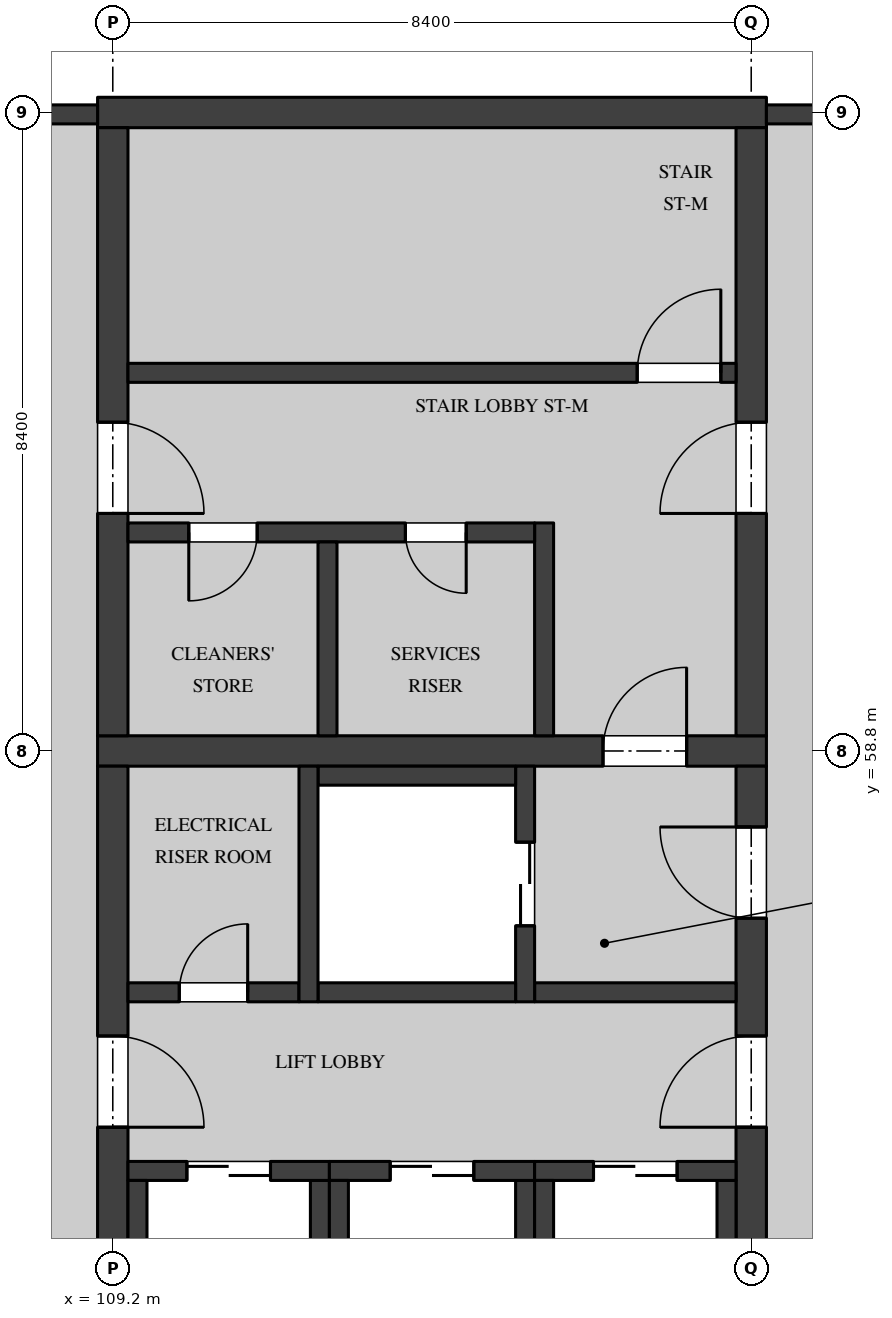
"""IFC4 building model, lengths in metres.
Left out: names, types, materials, properties, quantities, classifications, styles, units other than length and angle.
Written with IfcOpenShell. Run it as: python <this file> out.ifc"""

import sys

from ifc_helpers import new_model, si_unit, direction, frame, frame_2d, origin, place, context, subcontext, project, spatial, rectangle, extrude, element, fill, save


model = new_model("IFC4")
c1 = context("Model", 3, precision=1e-05, world=origin(), true_north=direction((0.0, 1.0)))
c2 = subcontext(c1, "Body", "Model", "MODEL_VIEW")
j1 = project(units=[si_unit("LENGTHUNIT", "METRE"), si_unit("PLANEANGLEUNIT", "RADIAN")], contexts=[c1])
p1 = place(None, origin())
s1 = spatial("IfcSite", under=j1, at=p1, CompositionType="ELEMENT")
p2 = place(p1, origin())
s2 = spatial("IfcBuilding", under=s1, at=p2, CompositionType="ELEMENT")
p3 = place(p2, frame((0.0, 0.0, 32.4)))
s3 = spatial("IfcBuildingStorey", under=s2, at=p3, CompositionType="ELEMENT", Elevation=32.4)
p4 = place(p3, frame((109.0, 58.8, 0.0), z_axis=(0.0, 0.0, 1.0), x_axis=(1.0, 0.0, 0.0)))
e1 = element("IfcWall", 1, at=p4, inside=s3, PredefinedType="SHEAR", context=c2, shape_type="SweptSolid", body=[
    extrude(rectangle(XDim=8.8, YDim=0.4, at=frame_2d((4.4, 0.0))), origin(), (0.0, 0.0, 1.0), 4.37),
])
p5 = place(p4, frame((6.65, 0.0, 0.0)))
e2 = element("IfcOpeningElement", 2, at=p5, cuts=e1, PredefinedType="OPENING", context=c2, shape_type="SweptSolid", body=[
    extrude(rectangle(XDim=1.1, YDim=2.1, at=frame_2d((0.55, 1.05))), frame((0.0, 0.21, 0.0), z_axis=(0.0, -1.0, 0.0), x_axis=(1.0, 0.0, 0.0)), (0.0, 0.0, 1.0), 0.42),
])
p6 = place(p3, frame((109.2, 50.6, 0.0), z_axis=(0.0, 0.0, 1.0), x_axis=(0.0, 1.0, 0.0)))
e3 = element("IfcWall", 3, at=p6, inside=s3, PredefinedType="SHEAR", context=c2, shape_type="SweptSolid", body=[
    extrude(rectangle(XDim=8.0, YDim=0.4, at=frame_2d((4.0, 0.0))), origin(), (0.0, 0.0, 1.0), 4.37),
])
p7 = place(p6, frame((3.25, 0.0, 0.0)))
e4 = element("IfcOpeningElement", 4, at=p7, cuts=e3, PredefinedType="OPENING", context=c2, shape_type="SweptSolid", body=[
    extrude(rectangle(XDim=1.2, YDim=2.1, at=frame_2d((0.6, 1.05))), frame((0.0, 0.21, 0.0), z_axis=(0.0, -1.0, 0.0), x_axis=(1.0, 0.0, 0.0)), (0.0, 0.0, 1.0), 0.42),
])
p8 = place(p3, frame((117.6, 50.6, 0.0), z_axis=(0.0, 0.0, 1.0), x_axis=(0.0, 1.0, 0.0)))
e5 = element("IfcWall", 5, at=p8, inside=s3, PredefinedType="SHEAR", context=c2, shape_type="SweptSolid", body=[
    extrude(rectangle(XDim=8.0, YDim=0.4, at=frame_2d((4.0, 0.0))), origin(), (0.0, 0.0, 1.0), 4.37),
])
p9 = place(p8, frame((3.25, 0.0, 0.0)))
e6 = element("IfcOpeningElement", 6, at=p9, cuts=e5, PredefinedType="OPENING", context=c2, shape_type="SweptSolid", body=[
    extrude(rectangle(XDim=1.2, YDim=2.1, at=frame_2d((0.6, 1.05))), frame((0.0, 0.21, 0.0), z_axis=(0.0, -1.0, 0.0), x_axis=(1.0, 0.0, 0.0)), (0.0, 0.0, 1.0), 0.42),
])
p10 = place(p8, frame((6.0, 0.0, 0.0)))
e7 = element("IfcOpeningElement", 7, at=p10, cuts=e5, PredefinedType="OPENING", context=c2, shape_type="SweptSolid", body=[
    extrude(rectangle(XDim=1.2, YDim=2.1, at=frame_2d((0.6, 1.05))), frame((0.0, 0.21, 0.0), z_axis=(0.0, -1.0, 0.0), x_axis=(1.0, 0.0, 0.0)), (0.0, 0.0, 1.0), 0.42),
])
p11 = place(p3, frame((109.4, 55.625, 0.0), z_axis=(0.0, 0.0, 1.0), x_axis=(1.0, 0.0, 0.0)))
e8 = element("IfcWall", 8, at=p11, inside=s3, PredefinedType="SOLIDWALL", context=c2, shape_type="SweptSolid", body=[
    extrude(rectangle(XDim=2.25, YDim=0.25, at=frame_2d((1.125, 0.0))), origin(), (0.0, 0.0, 1.0), 4.37),
])
p12 = place(p11, frame((0.675, 0.0, 0.0)))
e9 = element("IfcOpeningElement", 9, at=p12, cuts=e8, PredefinedType="OPENING", context=c2, shape_type="SweptSolid", body=[
    extrude(rectangle(XDim=0.9, YDim=2.1, at=frame_2d((0.45, 1.05))), frame((0.0, 0.135, 0.0), z_axis=(0.0, -1.0, 0.0), x_axis=(1.0, 0.0, 0.0)), (0.0, 0.0, 1.0), 0.27),
])
p13 = place(p3, frame((114.75, 55.625, 0.0), z_axis=(0.0, 0.0, 1.0), x_axis=(1.0, 0.0, 0.0)))
e10 = element("IfcWall", 10, at=p13, inside=s3, PredefinedType="SOLIDWALL", context=c2, shape_type="SweptSolid", body=[
    extrude(rectangle(XDim=2.65, YDim=0.25, at=frame_2d((1.325, 0.0))), origin(), (0.0, 0.0, 1.0), 4.37),
])
p14 = place(p3, frame((109.0, 67.2, 0.0), z_axis=(0.0, 0.0, 1.0), x_axis=(1.0, 0.0, 0.0)))
e11 = element("IfcWall", 11, at=p14, inside=s3, PredefinedType="SHEAR", context=c2, shape_type="SweptSolid", body=[
    extrude(rectangle(XDim=8.8, YDim=0.4, at=frame_2d((4.4, 0.0))), origin(), (0.0, 0.0, 1.0), 4.37),
])
p15 = place(p3, frame((109.2, 59.0, 0.0), z_axis=(0.0, 0.0, 1.0), x_axis=(0.0, 1.0, 0.0)))
e12 = element("IfcWall", 12, at=p15, inside=s3, PredefinedType="SHEAR", context=c2, shape_type="SweptSolid", body=[
    extrude(rectangle(XDim=8.0, YDim=0.4, at=frame_2d((4.0, 0.0))), origin(), (0.0, 0.0, 1.0), 4.37),
])
p16 = place(p15, frame((2.925, 0.0, 0.0)))
e13 = element("IfcOpeningElement", 13, at=p16, cuts=e12, PredefinedType="OPENING", context=c2, shape_type="SweptSolid", body=[
    extrude(rectangle(XDim=1.2, YDim=2.1, at=frame_2d((0.6, 1.05))), frame((0.0, 0.21, 0.0), z_axis=(0.0, -1.0, 0.0), x_axis=(1.0, 0.0, 0.0)), (0.0, 0.0, 1.0), 0.42),
])
p17 = place(p3, frame((117.6, 59.0, 0.0), z_axis=(0.0, 0.0, 1.0), x_axis=(0.0, 1.0, 0.0)))
e14 = element("IfcWall", 14, at=p17, inside=s3, PredefinedType="SHEAR", context=c2, shape_type="SweptSolid", body=[
    extrude(rectangle(XDim=8.0, YDim=0.4, at=frame_2d((4.0, 0.0))), origin(), (0.0, 0.0, 1.0), 4.37),
])
p18 = place(p17, frame((2.925, 0.0, 0.0)))
e15 = element("IfcOpeningElement", 15, at=p18, cuts=e14, PredefinedType="OPENING", context=c2, shape_type="SweptSolid", body=[
    extrude(rectangle(XDim=1.2, YDim=2.1, at=frame_2d((0.6, 1.05))), frame((0.0, 0.21, 0.0), z_axis=(0.0, -1.0, 0.0), x_axis=(1.0, 0.0, 0.0)), (0.0, 0.0, 1.0), 0.42),
])
p19 = place(p3, frame((117.4, 63.775, 0.0), z_axis=(0.0, 0.0, 1.0), x_axis=(-1.0, 0.0, 0.0)))
e16 = element("IfcWall", 16, at=p19, inside=s3, PredefinedType="SOLIDWALL", context=c2, shape_type="SweptSolid", body=[
    extrude(rectangle(XDim=8.0, YDim=0.25, at=frame_2d((4.0, 0.0))), origin(), (0.0, 0.0, 1.0), 4.37),
])
p20 = place(p19, frame((0.2, 0.0, 0.0)))
e17 = element("IfcOpeningElement", 17, at=p20, cuts=e16, PredefinedType="OPENING", context=c2, shape_type="SweptSolid", body=[
    extrude(rectangle(XDim=1.1, YDim=2.1, at=frame_2d((0.55, 1.05))), frame((0.0, 0.135, 0.0), z_axis=(0.0, -1.0, 0.0), x_axis=(1.0, 0.0, 0.0)), (0.0, 0.0, 1.0), 0.27),
])
p21 = place(p3, frame((114.875, 61.8, 0.0), z_axis=(0.0, 0.0, 1.0), x_axis=(0.0, -1.0, 0.0)))
e18 = element("IfcWall", 18, at=p21, inside=s3, PredefinedType="SOLIDWALL", context=c2, shape_type="SweptSolid", body=[
    extrude(rectangle(XDim=2.8, YDim=0.25, at=frame_2d((1.4, 0.0))), origin(), (0.0, 0.0, 1.0), 4.37),
])
p22 = place(p3, frame((114.75, 61.675, 0.0), z_axis=(0.0, 0.0, 1.0), x_axis=(-1.0, 0.0, 0.0)))
e19 = element("IfcWall", 19, at=p22, inside=s3, PredefinedType="SOLIDWALL", context=c2, shape_type="SweptSolid", body=[
    extrude(rectangle(XDim=5.35, YDim=0.25, at=frame_2d((2.675, 0.0))), origin(), (0.0, 0.0, 1.0), 4.37),
])
p23 = place(p22, frame((3.65, 0.0, 0.0)))
e20 = element("IfcOpeningElement", 20, at=p23, cuts=e19, PredefinedType="OPENING", context=c2, shape_type="SweptSolid", body=[
    extrude(rectangle(XDim=0.9, YDim=2.1, at=frame_2d((0.45, 1.05))), frame((0.0, 0.135, 0.0), z_axis=(0.0, -1.0, 0.0), x_axis=(1.0, 0.0, 0.0)), (0.0, 0.0, 1.0), 0.27),
])
p24 = place(p22, frame((0.9, 0.0, 0.0)))
e21 = element("IfcOpeningElement", 21, at=p24, cuts=e19, PredefinedType="OPENING", context=c2, shape_type="SweptSolid", body=[
    extrude(rectangle(XDim=0.8, YDim=2.1, at=frame_2d((0.4, 1.05))), frame((0.0, 0.135, 0.0), z_axis=(0.0, -1.0, 0.0), x_axis=(1.0, 0.0, 0.0)), (0.0, 0.0, 1.0), 0.27),
])
p25 = place(p3, frame((112.025, 61.55, 0.0), z_axis=(0.0, 0.0, 1.0), x_axis=(0.0, -1.0, 0.0)))
e22 = element("IfcWall", 22, at=p25, inside=s3, PredefinedType="SOLIDWALL", context=c2, shape_type="SweptSolid", body=[
    extrude(rectangle(XDim=2.55, YDim=0.25, at=frame_2d((1.275, 0.0))), origin(), (0.0, 0.0, 1.0), 4.37),
])
p26 = place(p3, frame((114.625, 55.5, 0.0), z_axis=(0.0, 0.0, 1.0), x_axis=(0.0, 1.0, 0.0)))
e23 = element("IfcWall", 23, at=p26, inside=s3, PredefinedType="SOLIDWALL", context=c2, shape_type="SweptSolid", body=[
    extrude(rectangle(XDim=3.1, YDim=0.25, at=frame_2d((1.55, 0.0))), origin(), (0.0, 0.0, 1.0), 4.37),
])
p27 = place(p26, frame((1.0, 0.0, 0.0)))
e24 = element("IfcOpeningElement", 24, at=p27, cuts=e23, PredefinedType="OPENING", context=c2, shape_type="SweptSolid", body=[
    extrude(rectangle(XDim=1.1, YDim=2.1, at=frame_2d((0.55, 1.05))), frame((0.0, 0.135, 0.0), z_axis=(0.0, -1.0, 0.0), x_axis=(1.0, 0.0, 0.0)), (0.0, 0.0, 1.0), 0.27),
])
for number, where, z_axis, x_axis in (
    (25, (111.9, 58.475, 0.0), (0.0, 0.0, 1.0), (1.0, 0.0, 0.0)),
    (26, (111.9, 55.625, 0.0), (0.0, 0.0, 1.0), (1.0, 0.0, 0.0)),
):
    element("IfcWall", number, at=place(p3, frame(where, z_axis=z_axis, x_axis=x_axis)), inside=s3, PredefinedType="SOLIDWALL", context=c2, shape_type="SweptSolid", body=[
        extrude(rectangle(XDim=2.6, YDim=0.25, at=frame_2d((1.3, 0.0))), origin(), (0.0, 0.0, 1.0), 4.37),
    ])
p28 = place(p3, frame((111.775, 55.5, 0.0), z_axis=(0.0, 0.0, 1.0), x_axis=(0.0, 1.0, 0.0)))
e27 = element("IfcWall", 27, at=p28, inside=s3, PredefinedType="SOLIDWALL", context=c2, shape_type="SweptSolid", body=[
    extrude(rectangle(XDim=3.1, YDim=0.25, at=frame_2d((1.55, 0.0))), origin(), (0.0, 0.0, 1.0), 4.37),
])
p29 = place(p3, frame((111.925, 50.85, 0.0), z_axis=(0.0, 0.0, 1.0), x_axis=(0.0, 1.0, 0.0)))
e28 = element("IfcWall", 28, at=p29, inside=s3, PredefinedType="SOLIDWALL", context=c2, shape_type="SweptSolid", body=[
    extrude(rectangle(XDim=2.3, YDim=0.25, at=frame_2d((1.15, 0.0))), origin(), (0.0, 0.0, 1.0), 4.37),
])
p30 = place(p3, frame((109.4, 53.275, 0.0), z_axis=(0.0, 0.0, 1.0), x_axis=(1.0, 0.0, 0.0)))
e29 = element("IfcWall", 29, at=p30, inside=s3, PredefinedType="SOLIDWALL", context=c2, shape_type="SweptSolid", body=[
    extrude(rectangle(XDim=2.65, YDim=0.25, at=frame_2d((1.325, 0.0))), origin(), (0.0, 0.0, 1.0), 4.37),
])
p31 = place(p30, frame((0.775, 0.0, 0.0)))
e30 = element("IfcOpeningElement", 30, at=p31, cuts=e29, PredefinedType="OPENING", context=c2, shape_type="SweptSolid", body=[
    extrude(rectangle(XDim=1.1, YDim=2.1, at=frame_2d((0.55, 1.05))), frame((0.0, 0.135, 0.0), z_axis=(0.0, -1.0, 0.0), x_axis=(1.0, 0.0, 0.0)), (0.0, 0.0, 1.0), 0.27),
])
for number, where, z_axis, x_axis in (
    (31, (109.525, 50.85, 0.0), (0.0, 0.0, 1.0), (0.0, 1.0, 0.0)),
    (32, (114.625, 50.85, 0.0), (0.0, 0.0, 1.0), (0.0, 1.0, 0.0)),
):
    element("IfcWall", number, at=place(p3, frame(where, z_axis=z_axis, x_axis=x_axis)), inside=s3, PredefinedType="SOLIDWALL", context=c2, shape_type="SweptSolid", body=[
        extrude(rectangle(XDim=2.3, YDim=0.25, at=frame_2d((1.15, 0.0))), origin(), (0.0, 0.0, 1.0), 4.37),
    ])
p32 = place(p3, frame((112.05, 53.275, 0.0), z_axis=(0.0, 0.0, 1.0), x_axis=(1.0, 0.0, 0.0)))
e33 = element("IfcWall", 33, at=p32, inside=s3, PredefinedType="SOLIDWALL", context=c2, shape_type="SweptSolid", body=[
    extrude(rectangle(XDim=2.7, YDim=0.25, at=frame_2d((1.35, 0.0))), origin(), (0.0, 0.0, 1.0), 4.37),
])
p33 = place(p32, frame((0.8, 0.0, 0.0)))
e34 = element("IfcOpeningElement", 34, at=p33, cuts=e33, PredefinedType="OPENING", context=c2, shape_type="SweptSolid", body=[
    extrude(rectangle(XDim=1.1, YDim=2.1, at=frame_2d((0.55, 1.05))), frame((0.0, 0.135, 0.0), z_axis=(0.0, -1.0, 0.0), x_axis=(1.0, 0.0, 0.0)), (0.0, 0.0, 1.0), 0.27),
])
for number, where, z_axis, x_axis in (
    (35, (112.175, 50.85, 0.0), (0.0, 0.0, 1.0), (0.0, 1.0, 0.0)),
    (36, (117.275, 50.85, 0.0), (0.0, 0.0, 1.0), (0.0, 1.0, 0.0)),
):
    element("IfcWall", number, at=place(p3, frame(where, z_axis=z_axis, x_axis=x_axis)), inside=s3, PredefinedType="SOLIDWALL", context=c2, shape_type="SweptSolid", body=[
        extrude(rectangle(XDim=2.3, YDim=0.25, at=frame_2d((1.15, 0.0))), origin(), (0.0, 0.0, 1.0), 4.37),
    ])
p34 = place(p3, frame((114.75, 53.275, 0.0), z_axis=(0.0, 0.0, 1.0), x_axis=(1.0, 0.0, 0.0)))
e37 = element("IfcWall", 37, at=p34, inside=s3, PredefinedType="SOLIDWALL", context=c2, shape_type="SweptSolid", body=[
    extrude(rectangle(XDim=2.65, YDim=0.25, at=frame_2d((1.325, 0.0))), origin(), (0.0, 0.0, 1.0), 4.37),
])
p35 = place(p34, frame((0.775, 0.0, 0.0)))
e38 = element("IfcOpeningElement", 38, at=p35, cuts=e37, PredefinedType="OPENING", context=c2, shape_type="SweptSolid", body=[
    extrude(rectangle(XDim=1.1, YDim=2.1, at=frame_2d((0.55, 1.05))), frame((0.0, 0.135, 0.0), z_axis=(0.0, -1.0, 0.0), x_axis=(1.0, 0.0, 0.0)), (0.0, 0.0, 1.0), 0.27),
])
p36 = place(p3, frame((114.875, 50.85, 0.0), z_axis=(0.0, 0.0, 1.0), x_axis=(0.0, 1.0, 0.0)))
e39 = element("IfcWall", 39, at=p36, inside=s3, PredefinedType="SOLIDWALL", context=c2, shape_type="SweptSolid", body=[
    extrude(rectangle(XDim=2.3, YDim=0.25, at=frame_2d((1.15, 0.0))), origin(), (0.0, 0.0, 1.0), 4.37),
])
p37 = place(p3, frame((125.996, 67.175, 0.0), z_axis=(0.0, 0.0, 1.0), x_axis=(-1.0, 0.0, 0.0)))
e40 = element("IfcWall", 40, at=p37, inside=s3, PredefinedType="SOLIDWALL", context=c2, shape_type="SweptSolid", body=[
    extrude(rectangle(XDim=8.196, YDim=0.25, at=frame_2d((4.098, 0.0))), origin(), (0.0, 0.0, 1.0), 3.746),
])
p38 = place(p3, frame((109.0, 67.175, 0.0), z_axis=(0.0, 0.0, 1.0), x_axis=(-1.0, 0.0, 0.0)))
e41 = element("IfcWall", 41, at=p38, inside=s3, PredefinedType="SOLIDWALL", context=c2, shape_type="SweptSolid", body=[
    extrude(rectangle(XDim=8.196, YDim=0.25, at=frame_2d((4.098, 0.0))), origin(), (0.0, 0.0, 1.0), 3.746),
])
p39 = place(p38, frame((5.5, 0.0, 2.1)))
e42 = element("IfcOpeningElement", 42, at=p39, cuts=e41, PredefinedType="OPENING", context=c2, shape_type="SweptSolid", body=[
    extrude(rectangle(XDim=1.2, YDim=0.45, at=frame_2d((0.6, 0.225))), frame((0.0, 0.135, 0.0), z_axis=(0.0, -1.0, 0.0), x_axis=(1.0, 0.0, 0.0)), (0.0, 0.0, 1.0), 0.27),
])
p40 = place(p7, frame((1.2, 0.0, 0.0), z_axis=(0.0, 0.0, 1.0), x_axis=(-1.0, 0.0, 0.0)))
e43 = element("IfcDoor", 43, at=p40, inside=s3, OperationType="SINGLE_SWING_LEFT", PredefinedType="DOOR", context=c2, shape_type="SweptSolid", body=[
    extrude(rectangle(XDim=1.2, YDim=2.1, at=frame_2d((0.6, 1.05))), frame((0.0, 0.035, 0.0), z_axis=(0.0, -1.0, 0.0), x_axis=(1.0, 0.0, 0.0)), (0.0, 0.0, 1.0), 0.07),
])
fill(e4, e43)
p41 = place(p9, origin())
e44 = element("IfcDoor", 44, at=p41, inside=s3, OperationType="SINGLE_SWING_RIGHT", PredefinedType="DOOR", context=c2, shape_type="SweptSolid", body=[
    extrude(rectangle(XDim=1.2, YDim=2.1, at=frame_2d((0.6, 1.05))), frame((0.0, 0.035, 0.0), z_axis=(0.0, -1.0, 0.0), x_axis=(1.0, 0.0, 0.0)), (0.0, 0.0, 1.0), 0.07),
])
fill(e6, e44)
p42 = place(p10, origin())
e45 = element("IfcDoor", 45, at=p42, inside=s3, OperationType="SINGLE_SWING_LEFT", PredefinedType="DOOR", context=c2, shape_type="SweptSolid", body=[
    extrude(rectangle(XDim=1.2, YDim=2.1, at=frame_2d((0.6, 1.05))), frame((0.0, 0.035, 0.0), z_axis=(0.0, -1.0, 0.0), x_axis=(1.0, 0.0, 0.0)), (0.0, 0.0, 1.0), 0.07),
])
fill(e7, e45)
p43 = place(p5, origin())
e46 = element("IfcDoor", 46, at=p43, inside=s3, OperationType="SINGLE_SWING_LEFT", PredefinedType="DOOR", context=c2, shape_type="SweptSolid", body=[
    extrude(rectangle(XDim=1.1, YDim=2.1, at=frame_2d((0.55, 1.05))), frame((0.0, 0.035, 0.0), z_axis=(0.0, -1.0, 0.0), x_axis=(1.0, 0.0, 0.0)), (0.0, 0.0, 1.0), 0.07),
])
fill(e2, e46)
p44 = place(p12, origin())
e47 = element("IfcDoor", 47, at=p44, inside=s3, OperationType="SINGLE_SWING_LEFT", PredefinedType="DOOR", context=c2, shape_type="SweptSolid", body=[
    extrude(rectangle(XDim=0.9, YDim=2.1, at=frame_2d((0.45, 1.05))), frame((0.0, 0.05, 0.0), z_axis=(0.0, -1.0, 0.0), x_axis=(1.0, 0.0, 0.0)), (0.0, 0.0, 1.0), 0.1),
])
fill(e9, e47)
p45 = place(p23, origin())
e48 = element("IfcDoor", 48, at=p45, inside=s3, OperationType="SINGLE_SWING_LEFT", PredefinedType="DOOR", context=c2, shape_type="SweptSolid", body=[
    extrude(rectangle(XDim=0.9, YDim=2.1, at=frame_2d((0.45, 1.05))), frame((0.0, 0.035, 0.0), z_axis=(0.0, -1.0, 0.0), x_axis=(1.0, 0.0, 0.0)), (0.0, 0.0, 1.0), 0.07),
])
fill(e20, e48)
p46 = place(p16, frame((1.2, 0.0, 0.0), z_axis=(0.0, 0.0, 1.0), x_axis=(-1.0, 0.0, 0.0)))
e49 = element("IfcDoor", 49, at=p46, inside=s3, OperationType="SINGLE_SWING_LEFT", PredefinedType="DOOR", context=c2, shape_type="SweptSolid", body=[
    extrude(rectangle(XDim=1.2, YDim=2.1, at=frame_2d((0.6, 1.05))), frame((0.0, 0.035, 0.0), z_axis=(0.0, -1.0, 0.0), x_axis=(1.0, 0.0, 0.0)), (0.0, 0.0, 1.0), 0.07),
])
fill(e13, e49)
p47 = place(p18, origin())
e50 = element("IfcDoor", 50, at=p47, inside=s3, OperationType="SINGLE_SWING_RIGHT", PredefinedType="DOOR", context=c2, shape_type="SweptSolid", body=[
    extrude(rectangle(XDim=1.2, YDim=2.1, at=frame_2d((0.6, 1.05))), frame((0.0, 0.035, 0.0), z_axis=(0.0, -1.0, 0.0), x_axis=(1.0, 0.0, 0.0)), (0.0, 0.0, 1.0), 0.07),
])
fill(e15, e50)
p48 = place(p24, origin())
e51 = element("IfcDoor", 51, at=p48, inside=s3, OperationType="SINGLE_SWING_RIGHT", PredefinedType="DOOR", context=c2, shape_type="SweptSolid", body=[
    extrude(rectangle(XDim=0.8, YDim=2.1, at=frame_2d((0.4, 1.05))), frame((0.0, 0.035, 0.0), z_axis=(0.0, -1.0, 0.0), x_axis=(1.0, 0.0, 0.0)), (0.0, 0.0, 1.0), 0.07),
])
fill(e21, e51)
p49 = place(p20, frame((1.1, 0.0, 0.0), z_axis=(0.0, 0.0, 1.0), x_axis=(-1.0, 0.0, 0.0)))
e52 = element("IfcDoor", 52, at=p49, inside=s3, OperationType="SINGLE_SWING_LEFT", PredefinedType="DOOR", context=c2, shape_type="SweptSolid", body=[
    extrude(rectangle(XDim=1.1, YDim=2.1, at=frame_2d((0.55, 1.05))), frame((0.0, 0.035, 0.0), z_axis=(0.0, -1.0, 0.0), x_axis=(1.0, 0.0, 0.0)), (0.0, 0.0, 1.0), 0.07),
])
fill(e17, e52)
p50 = place(p27, origin())
e53 = element("IfcDoor", 53, at=p50, inside=s3, OperationType="DOUBLE_DOOR_SLIDING", PredefinedType="DOOR", context=c2, shape_type="SweptSolid", body=[
    extrude(rectangle(XDim=1.1, YDim=2.1, at=frame_2d((0.55, 1.05))), frame((0.0, 0.04, 0.0), z_axis=(0.0, -1.0, 0.0), x_axis=(1.0, 0.0, 0.0)), (0.0, 0.0, 1.0), 0.08),
])
fill(e24, e53)
p51 = place(p31, origin())
e54 = element("IfcDoor", 54, at=p51, inside=s3, OperationType="DOUBLE_DOOR_SLIDING", PredefinedType="DOOR", context=c2, shape_type="SweptSolid", body=[
    extrude(rectangle(XDim=1.1, YDim=2.1, at=frame_2d((0.55, 1.05))), frame((0.0, 0.04, 0.0), z_axis=(0.0, -1.0, 0.0), x_axis=(1.0, 0.0, 0.0)), (0.0, 0.0, 1.0), 0.08),
])
fill(e30, e54)
p52 = place(p33, origin())
e55 = element("IfcDoor", 55, at=p52, inside=s3, OperationType="DOUBLE_DOOR_SLIDING", PredefinedType="DOOR", context=c2, shape_type="SweptSolid", body=[
    extrude(rectangle(XDim=1.1, YDim=2.1, at=frame_2d((0.55, 1.05))), frame((0.0, 0.04, 0.0), z_axis=(0.0, -1.0, 0.0), x_axis=(1.0, 0.0, 0.0)), (0.0, 0.0, 1.0), 0.08),
])
fill(e34, e55)
p53 = place(p35, origin())
e56 = element("IfcDoor", 56, at=p53, inside=s3, OperationType="DOUBLE_DOOR_SLIDING", PredefinedType="DOOR", context=c2, shape_type="SweptSolid", body=[
    extrude(rectangle(XDim=1.1, YDim=2.1, at=frame_2d((0.55, 1.05))), frame((0.0, 0.04, 0.0), z_axis=(0.0, -1.0, 0.0), x_axis=(1.0, 0.0, 0.0)), (0.0, 0.0, 1.0), 0.08),
])
fill(e38, e56)
save(model, sys.argv[1])
